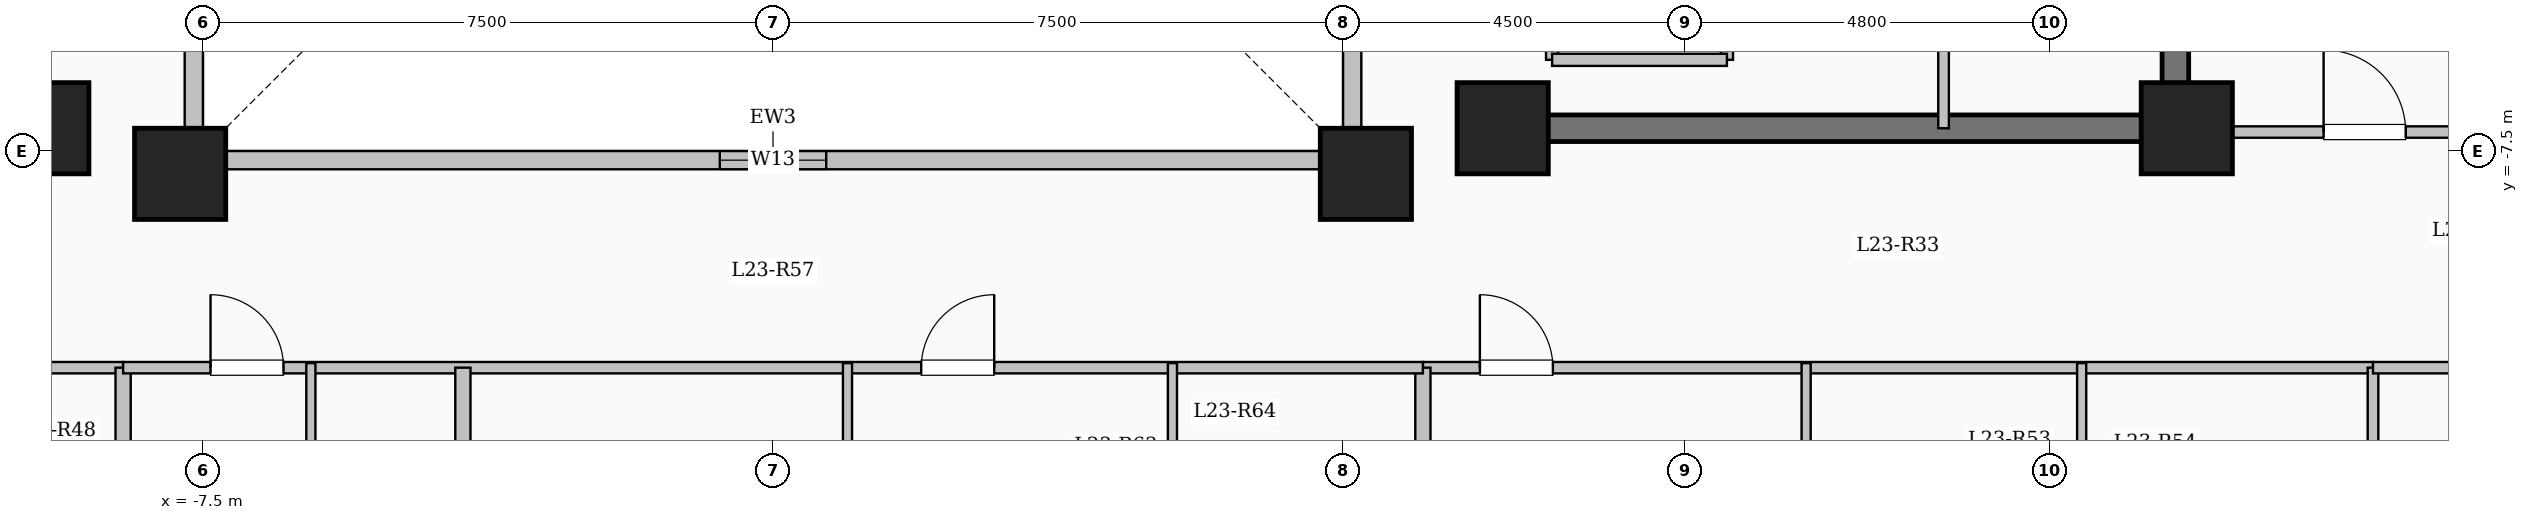
"""IFC4 building model, lengths in metres.
Left out: names, types, materials, properties, quantities, classifications, styles, units other than length and angle.
Written with IfcOpenShell. Run it as: python <this file> out.ifc"""

import sys

from ifc_helpers import new_model, si_unit, direction, frame, frame_2d, origin, origin_2d, place, context, subcontext, project, spatial, rectangle, extrude, element, fill, save


model = new_model("IFC4")
c1 = context("Model", 3, precision=1e-05, world=origin(), true_north=direction((0.0, 1.0)))
c2 = subcontext(c1, "Body", "Model", "MODEL_VIEW")
j1 = project(units=[si_unit("LENGTHUNIT", "METRE"), si_unit("PLANEANGLEUNIT", "RADIAN")], contexts=[c1])
p1 = place(None, origin())
s1 = spatial("IfcSite", under=j1, at=p1, CompositionType="ELEMENT")
p2 = place(p1, origin())
s2 = spatial("IfcBuilding", under=s1, at=p2, CompositionType="ELEMENT")
p3 = place(p2, frame((0.0, 0.0, 88.35)))
s3 = spatial("IfcBuildingStorey", under=s2, at=p3, CompositionType="ELEMENT", Elevation=88.35)
for number, where, z_axis, x_axis in (
    (1, (-7.8, -7.8, 0.0), (0.0, 0.0, 1.0), (1.0, 0.0, 0.0)),
    (2, (7.8, -7.8, 0.0), (0.0, 0.0, 1.0), (1.0, 0.0, 0.0)),
    (3, (-9.6, -7.2, 0.0), (0.0, 0.0, 1.0), (1.0, 0.0, 0.0)),
    (4, (9.6, -7.2, 0.0), (0.0, 0.0, 1.0), (1.0, 0.0, 0.0)),
    (5, (18.6, -7.2, 0.0), (0.0, 0.0, 1.0), (1.0, 0.0, 0.0)),
):
    element("IfcColumn", number, at=place(p3, frame(where, z_axis=z_axis, x_axis=x_axis)), inside=s3, PredefinedType="COLUMN", context=c2, shape_type="SweptSolid", body=[
        extrude(rectangle(XDim=1.2, YDim=1.2, at=origin_2d()), origin(), (0.0, 0.0, 1.0), 3.35),
    ])
p4 = place(p3, frame((-7.62, -7.62, 0.0), z_axis=(0.0, 0.0, 1.0), x_axis=(1.0, 0.0, 0.0)))
e6 = element("IfcWall", 6, at=p4, inside=s3, PredefinedType="SOLIDWALL", context=c2, shape_type="SweptSolid", body=[
    extrude(rectangle(XDim=15.24, YDim=0.24, at=frame_2d((7.62, 0.0))), origin(), (0.0, 0.0, 1.0), 3.1),
])
p5 = place(p4, frame((6.92, 0.0, 0.95)))
e7 = element("IfcOpeningElement", 7, at=p5, cuts=e6, PredefinedType="OPENING", context=c2, shape_type="SweptSolid", body=[
    extrude(rectangle(XDim=1.4, YDim=1.5, at=frame_2d((0.7, 0.75))), frame((0.0, 0.13, 0.0), z_axis=(0.0, -1.0, 0.0), x_axis=(1.0, 0.0, 0.0)), (0.0, 0.0, 1.0), 0.26),
])
p6 = place(p3, frame((7.62, -7.62, 0.0), z_axis=(0.0, 0.0, 1.0), x_axis=(0.0, 1.0, 0.0)))
e8 = element("IfcWall", 8, at=p6, inside=s3, PredefinedType="SOLIDWALL", context=c2, shape_type="SweptSolid", body=[
    extrude(rectangle(XDim=15.24, YDim=0.24, at=frame_2d((7.62, 0.0))), origin(), (0.0, 0.0, 1.0), 3.1),
])
p7 = place(p6, frame((6.92, 0.0, 0.95)))
e9 = element("IfcOpeningElement", 9, at=p7, cuts=e8, PredefinedType="OPENING", context=c2, shape_type="SweptSolid", body=[
    extrude(rectangle(XDim=1.4, YDim=1.5, at=frame_2d((0.7, 0.75))), frame((0.0, 0.13, 0.0), z_axis=(0.0, -1.0, 0.0), x_axis=(1.0, 0.0, 0.0)), (0.0, 0.0, 1.0), 0.26),
])
p8 = place(p3, frame((-7.62, 7.62, 0.0), z_axis=(0.0, 0.0, 1.0), x_axis=(0.0, -1.0, 0.0)))
e10 = element("IfcWall", 10, at=p8, inside=s3, PredefinedType="SOLIDWALL", context=c2, shape_type="SweptSolid", body=[
    extrude(rectangle(XDim=15.24, YDim=0.24, at=frame_2d((7.62, 0.0))), origin(), (0.0, 0.0, 1.0), 3.1),
])
p9 = place(p8, frame((6.92, 0.0, 0.95)))
e11 = element("IfcOpeningElement", 11, at=p9, cuts=e10, PredefinedType="OPENING", context=c2, shape_type="SweptSolid", body=[
    extrude(rectangle(XDim=1.4, YDim=1.5, at=frame_2d((0.7, 0.75))), frame((0.0, 0.13, 0.0), z_axis=(0.0, -1.0, 0.0), x_axis=(1.0, 0.0, 0.0)), (0.0, 0.0, 1.0), 0.26),
])
p10 = place(p3, frame((10.25, -6.3, 0.0), z_axis=(0.0, 0.0, 1.0), x_axis=(0.0, 1.0, 0.0)))
e12 = element("IfcWall", 12, at=p10, inside=s3, PredefinedType="SOLIDWALL", context=c2, shape_type="SweptSolid", body=[
    extrude(rectangle(XDim=2.6, YDim=0.16, at=frame_2d((1.3, 0.0))), origin(), (0.0, 0.0, 1.0), 3.1),
])
p11 = place(p10, frame((0.75, 0.0, 0.0)))
e13 = element("IfcOpeningElement", 13, at=p11, cuts=e12, PredefinedType="OPENING", context=c2, shape_type="SweptSolid", body=[
    extrude(rectangle(XDim=1.1, YDim=2.15, at=frame_2d((0.55, 1.075))), frame((0.0, 0.09, 0.0), z_axis=(0.0, -1.0, 0.0), x_axis=(1.0, 0.0, 0.0)), (0.0, 0.0, 1.0), 0.18),
])
p12 = place(p3, frame((12.55, -6.3, 0.0), z_axis=(0.0, 0.0, 1.0), x_axis=(0.0, 1.0, 0.0)))
e14 = element("IfcWall", 14, at=p12, inside=s3, PredefinedType="SOLIDWALL", context=c2, shape_type="SweptSolid", body=[
    extrude(rectangle(XDim=2.6, YDim=0.16, at=frame_2d((1.3, 0.0))), origin(), (0.0, 0.0, 1.0), 3.1),
])
p13 = place(p3, frame((10.25, -6.3, 0.0), z_axis=(0.0, 0.0, 1.0), x_axis=(1.0, 0.0, 0.0)))
e15 = element("IfcWall", 15, at=p13, inside=s3, PredefinedType="SOLIDWALL", context=c2, shape_type="SweptSolid", body=[
    extrude(rectangle(XDim=2.3, YDim=0.16, at=frame_2d((1.15, 0.0))), origin(), (0.0, 0.0, 1.0), 3.1),
])
p14 = place(p3, frame((18.45, -7.375, 0.0), z_axis=(0.0, 0.0, 1.0), x_axis=(0.0, 1.0, 0.0)))
e16 = element("IfcWall", 16, at=p14, inside=s3, PredefinedType="SHEAR", context=c2, shape_type="SweptSolid", body=[
    extrude(rectangle(XDim=14.05, YDim=0.35, at=frame_2d((7.025, 0.0))), origin(), (0.0, 0.0, 1.0), 3.35),
])
p15 = place(p3, frame((10.075, -7.2, 0.0), z_axis=(0.0, 0.0, 1.0), x_axis=(1.0, 0.0, 0.0)))
e17 = element("IfcWall", 17, at=p15, inside=s3, PredefinedType="SHEAR", context=c2, shape_type="SweptSolid", body=[
    extrude(rectangle(XDim=8.55, YDim=0.35, at=frame_2d((4.275, 0.0))), origin(), (0.0, 0.0, 1.0), 3.35),
])
p16 = place(p3, frame((15.4, -7.2, 0.0), z_axis=(0.0, 0.0, 1.0), x_axis=(0.0, 1.0, 0.0)))
e18 = element("IfcWall", 18, at=p16, inside=s3, PredefinedType="PARTITIONING", context=c2, shape_type="SweptSolid", body=[
    extrude(rectangle(XDim=10.45, YDim=0.14, at=frame_2d((5.225, 0.0))), origin(), (0.0, 0.0, 1.0), 3.1),
])
p17 = place(p16, frame((9.25, 0.0, 0.0)))
e19 = element("IfcOpeningElement", 19, at=p17, cuts=e18, PredefinedType="OPENING", context=c2, shape_type="SweptSolid", body=[
    extrude(rectangle(XDim=0.9, YDim=2.08, at=frame_2d((0.45, 1.04))), frame((0.0, 0.08, 0.0), z_axis=(0.0, -1.0, 0.0), x_axis=(1.0, 0.0, 0.0)), (0.0, 0.0, 1.0), 0.16),
])
p18 = place(p3, frame((-21.05, -10.35, 0.0), z_axis=(0.0, 0.0, 1.0), x_axis=(1.0, 0.0, 0.0)))
e20 = element("IfcWall", 20, at=p18, inside=s3, PredefinedType="PARTITIONING", context=c2, shape_type="SweptSolid", body=[
    extrude(rectangle(XDim=12.5, YDim=0.15, at=frame_2d((6.25, 0.0))), origin(), (0.0, 0.0, 1.0), 3.1),
])
p19 = place(p18, frame((0.7, 0.0, 0.0)))
e21 = element("IfcOpeningElement", 21, at=p19, cuts=e20, PredefinedType="OPENING", context=c2, shape_type="SweptSolid", body=[
    extrude(rectangle(XDim=0.96, YDim=2.15, at=frame_2d((0.48, 1.075))), frame((0.0, 0.085, 0.0), z_axis=(0.0, -1.0, 0.0), x_axis=(1.0, 0.0, 0.0)), (0.0, 0.0, 1.0), 0.17),
])
p20 = place(p3, frame((8.55, -10.35, 0.0), z_axis=(0.0, 0.0, 1.0), x_axis=(1.0, 0.0, 0.0)))
e22 = element("IfcWall", 22, at=p20, inside=s3, PredefinedType="PARTITIONING", context=c2, shape_type="SweptSolid", body=[
    extrude(rectangle(XDim=12.5, YDim=0.15, at=frame_2d((6.25, 0.0))), origin(), (0.0, 0.0, 1.0), 3.1),
])
p21 = place(p20, frame((0.75, 0.0, 0.0)))
e23 = element("IfcOpeningElement", 23, at=p21, cuts=e22, PredefinedType="OPENING", context=c2, shape_type="SweptSolid", body=[
    extrude(rectangle(XDim=0.96, YDim=2.15, at=frame_2d((0.48, 1.075))), frame((0.0, 0.085, 0.0), z_axis=(0.0, -1.0, 0.0), x_axis=(1.0, 0.0, 0.0)), (0.0, 0.0, 1.0), 0.17),
])
p22 = place(p3, frame((13.592, -22.1, 0.0), z_axis=(0.0, 0.0, 1.0), x_axis=(0.0, 1.0, 0.0)))
e24 = element("IfcWall", 24, at=p22, inside=s3, PredefinedType="PARTITIONING", context=c2, shape_type="SweptSolid", body=[
    extrude(rectangle(XDim=11.81, YDim=0.12, at=frame_2d((5.905, 0.0))), origin(), (0.0, 0.0, 1.0), 3.1),
])
p23 = place(p22, frame((7.475, 0.0, 0.0)))
e25 = element("IfcOpeningElement", 25, at=p23, cuts=e24, PredefinedType="OPENING", context=c2, shape_type="SweptSolid", body=[
    extrude(rectangle(XDim=1.08, YDim=2.15, at=frame_2d((0.54, 1.075))), frame((0.0, 0.07, 0.0), z_axis=(0.0, -1.0, 0.0), x_axis=(1.0, 0.0, 0.0)), (0.0, 0.0, 1.0), 0.14),
])
p24 = place(p3, frame((17.217, -13.26, 0.0), z_axis=(0.0, 0.0, 1.0), x_axis=(0.0, 1.0, 0.0)))
e26 = element("IfcWall", 26, at=p24, inside=s3, PredefinedType="PARTITIONING", context=c2, shape_type="SweptSolid", body=[
    extrude(rectangle(XDim=2.97, YDim=0.12, at=frame_2d((1.485, 0.0))), origin(), (0.0, 0.0, 1.0), 3.1),
])
for number, where, z_axis, x_axis in (
    (27, (-8.55, -22.704, 0.0), (0.0, 0.0, 1.0), (0.0, 1.0, 0.0)),
    (28, (8.55, -22.704, 0.0), (0.0, 0.0, 1.0), (0.0, 1.0, 0.0)),
):
    element("IfcWall", number, at=place(p3, frame(where, z_axis=z_axis, x_axis=x_axis)), inside=s3, PredefinedType="SOLIDWALL", context=c2, shape_type="SweptSolid", body=[
        extrude(rectangle(XDim=12.354, YDim=0.2, at=frame_2d((6.177, 0.0))), origin(), (0.0, 0.0, 1.0), 3.1),
    ])
p25 = place(p3, frame((-8.55, -10.35, 0.0), z_axis=(0.0, 0.0, 1.0), x_axis=(1.0, 0.0, 0.0)))
e29 = element("IfcWall", 29, at=p25, inside=s3, PredefinedType="PARTITIONING", context=c2, shape_type="SweptSolid", body=[
    extrude(rectangle(XDim=17.1, YDim=0.15, at=frame_2d((8.55, 0.0))), origin(), (0.0, 0.0, 1.0), 3.1),
])
p26 = place(p25, frame((1.15, 0.0, 0.0)))
e30 = element("IfcOpeningElement", 30, at=p26, cuts=e29, PredefinedType="OPENING", context=c2, shape_type="SweptSolid", body=[
    extrude(rectangle(XDim=0.96, YDim=2.15, at=frame_2d((0.48, 1.075))), frame((0.0, 0.085, 0.0), z_axis=(0.0, -1.0, 0.0), x_axis=(1.0, 0.0, 0.0)), (0.0, 0.0, 1.0), 0.17),
])
p27 = place(p25, frame((10.5, 0.0, 0.0)))
e31 = element("IfcOpeningElement", 31, at=p27, cuts=e29, PredefinedType="OPENING", context=c2, shape_type="SweptSolid", body=[
    extrude(rectangle(XDim=0.96, YDim=2.15, at=frame_2d((0.48, 1.075))), frame((0.0, 0.085, 0.0), z_axis=(0.0, -1.0, 0.0), x_axis=(1.0, 0.0, 0.0)), (0.0, 0.0, 1.0), 0.17),
])
p28 = place(p3, frame((-4.08, -22.05, 0.0), z_axis=(0.0, 0.0, 1.0), x_axis=(0.0, 1.0, 0.0)))
e32 = element("IfcWall", 32, at=p28, inside=s3, PredefinedType="SOLIDWALL", context=c2, shape_type="SweptSolid", body=[
    extrude(rectangle(XDim=11.7, YDim=0.2, at=frame_2d((5.85, 0.0))), origin(), (0.0, 0.0, 1.0), 3.1),
])
p29 = place(p3, frame((-6.08, -13.51, 0.0), z_axis=(0.0, 0.0, 1.0), x_axis=(0.0, 1.0, 0.0)))
e33 = element("IfcWall", 33, at=p29, inside=s3, PredefinedType="PARTITIONING", context=c2, shape_type="SweptSolid", body=[
    extrude(rectangle(XDim=3.22, YDim=0.12, at=frame_2d((1.61, 0.0))), origin(), (0.0, 0.0, 1.0), 3.1),
])
p30 = place(p29, frame((1.14, 0.0, 0.0)))
e34 = element("IfcOpeningElement", 34, at=p30, cuts=e33, PredefinedType="OPENING", context=c2, shape_type="SweptSolid", body=[
    extrude(rectangle(XDim=0.88, YDim=2.1, at=frame_2d((0.44, 1.05))), frame((0.0, 0.07, 0.0), z_axis=(0.0, -1.0, 0.0), x_axis=(1.0, 0.0, 0.0)), (0.0, 0.0, 1.0), 0.14),
])
p31 = place(p3, frame((0.98, -23.58, 0.0), z_axis=(0.0, 0.0, 1.0), x_axis=(0.0, 1.0, 0.0)))
e35 = element("IfcWall", 35, at=p31, inside=s3, PredefinedType="PARTITIONING", context=c2, shape_type="SweptSolid", body=[
    extrude(rectangle(XDim=13.29, YDim=0.12, at=frame_2d((6.645, 0.0))), origin(), (0.0, 0.0, 1.0), 3.1),
])
p32 = place(p31, frame((9.295, 0.0, 0.0)))
e36 = element("IfcOpeningElement", 36, at=p32, cuts=e35, PredefinedType="OPENING", context=c2, shape_type="SweptSolid", body=[
    extrude(rectangle(XDim=1.08, YDim=2.15, at=frame_2d((0.54, 1.075))), frame((0.0, 0.07, 0.0), z_axis=(0.0, -1.0, 0.0), x_axis=(1.0, 0.0, 0.0)), (0.0, 0.0, 1.0), 0.14),
])
p33 = place(p3, frame((5.255, -12.92, 0.0), z_axis=(0.0, 0.0, 1.0), x_axis=(0.0, 1.0, 0.0)))
e37 = element("IfcWall", 37, at=p33, inside=s3, PredefinedType="PARTITIONING", context=c2, shape_type="SweptSolid", body=[
    extrude(rectangle(XDim=2.63, YDim=0.12, at=frame_2d((1.315, 0.0))), origin(), (0.0, 0.0, 1.0), 3.1),
])
p34 = place(p3, frame((18.45, -7.25, 0.0), z_axis=(0.0, 0.0, 1.0), x_axis=(1.0, 0.0, 0.0)))
e38 = element("IfcWall", 38, at=p34, inside=s3, PredefinedType="PARTITIONING", context=c2, shape_type="SweptSolid", body=[
    extrude(rectangle(XDim=8.43, YDim=0.15, at=frame_2d((4.215, 0.0))), origin(), (0.0, 0.0, 1.0), 3.1),
])
p35 = place(p34, frame((1.95, 0.0, 0.0)))
e39 = element("IfcOpeningElement", 39, at=p35, cuts=e38, PredefinedType="OPENING", context=c2, shape_type="SweptSolid", body=[
    extrude(rectangle(XDim=1.08, YDim=2.15, at=frame_2d((0.54, 1.075))), frame((0.0, 0.085, 0.0), z_axis=(0.0, -1.0, 0.0), x_axis=(1.0, 0.0, 0.0)), (0.0, 0.0, 1.0), 0.17),
])
p36 = place(p3, frame((21.05, -17.85, 0.0), z_axis=(0.0, 0.0, 1.0), x_axis=(0.0, 1.0, 0.0)))
e40 = element("IfcWall", 40, at=p36, inside=s3, PredefinedType="PARTITIONING", context=c2, shape_type="SweptSolid", body=[
    extrude(rectangle(XDim=7.5, YDim=0.14, at=frame_2d((3.75, 0.0))), origin(), (0.0, 0.0, 1.0), 3.1),
])
p37 = place(p3, frame((21.05, -10.35, 0.0), z_axis=(0.0, 0.0, 1.0), x_axis=(1.0, 0.0, 0.0)))
e41 = element("IfcWall", 41, at=p37, inside=s3, PredefinedType="PARTITIONING", context=c2, shape_type="SweptSolid", body=[
    extrude(rectangle(XDim=5.83, YDim=0.15, at=frame_2d((2.915, 0.0))), origin(), (0.0, 0.0, 1.0), 3.1),
])
p38 = place(p37, frame((2.44, 0.0, 0.0)))
e42 = element("IfcOpeningElement", 42, at=p38, cuts=e41, PredefinedType="OPENING", context=c2, shape_type="SweptSolid", body=[
    extrude(rectangle(XDim=0.95, YDim=2.15, at=frame_2d((0.475, 1.075))), frame((0.0, 0.085, 0.0), z_axis=(0.0, -1.0, 0.0), x_axis=(1.0, 0.0, 0.0)), (0.0, 0.0, 1.0), 0.17),
])
p39 = place(p5, origin())
e43 = element("IfcWindow", 43, at=p39, inside=s3, PartitioningType="SINGLE_PANEL", PredefinedType="WINDOW", context=c2, shape_type="SweptSolid", body=[
    extrude(rectangle(XDim=1.4, YDim=1.5, at=frame_2d((0.7, 0.75))), frame((0.0, 0.03, 0.0), z_axis=(0.0, -1.0, 0.0), x_axis=(1.0, 0.0, 0.0)), (0.0, 0.0, 1.0), 0.06),
])
fill(e7, e43)
p40 = place(p21, origin())
e44 = element("IfcDoor", 44, at=p40, inside=s3, OperationType="SINGLE_SWING_LEFT", PredefinedType="DOOR", context=c2, shape_type="SweptSolid", body=[
    extrude(rectangle(XDim=0.96, YDim=2.15, at=frame_2d((0.48, 1.075))), frame((0.0, 0.025, 0.0), z_axis=(0.0, -1.0, 0.0), x_axis=(1.0, 0.0, 0.0)), (0.0, 0.0, 1.0), 0.05),
])
fill(e23, e44)
p41 = place(p26, origin())
e45 = element("IfcDoor", 45, at=p41, inside=s3, OperationType="SINGLE_SWING_LEFT", PredefinedType="DOOR", context=c2, shape_type="SweptSolid", body=[
    extrude(rectangle(XDim=0.96, YDim=2.15, at=frame_2d((0.48, 1.075))), frame((0.0, 0.025, 0.0), z_axis=(0.0, -1.0, 0.0), x_axis=(1.0, 0.0, 0.0)), (0.0, 0.0, 1.0), 0.05),
])
fill(e30, e45)
p42 = place(p27, origin())
e46 = element("IfcDoor", 46, at=p42, inside=s3, OperationType="SINGLE_SWING_RIGHT", PredefinedType="DOOR", context=c2, shape_type="SweptSolid", body=[
    extrude(rectangle(XDim=0.96, YDim=2.15, at=frame_2d((0.48, 1.075))), frame((0.0, 0.025, 0.0), z_axis=(0.0, -1.0, 0.0), x_axis=(1.0, 0.0, 0.0)), (0.0, 0.0, 1.0), 0.05),
])
fill(e31, e46)
p43 = place(p35, origin())
e47 = element("IfcDoor", 47, at=p43, inside=s3, OperationType="SINGLE_SWING_LEFT", PredefinedType="DOOR", context=c2, shape_type="SweptSolid", body=[
    extrude(rectangle(XDim=1.08, YDim=2.15, at=frame_2d((0.54, 1.075))), frame((0.0, 0.025, 0.0), z_axis=(0.0, -1.0, 0.0), x_axis=(1.0, 0.0, 0.0)), (0.0, 0.0, 1.0), 0.05),
])
fill(e39, e47)
save(model, sys.argv[1])
